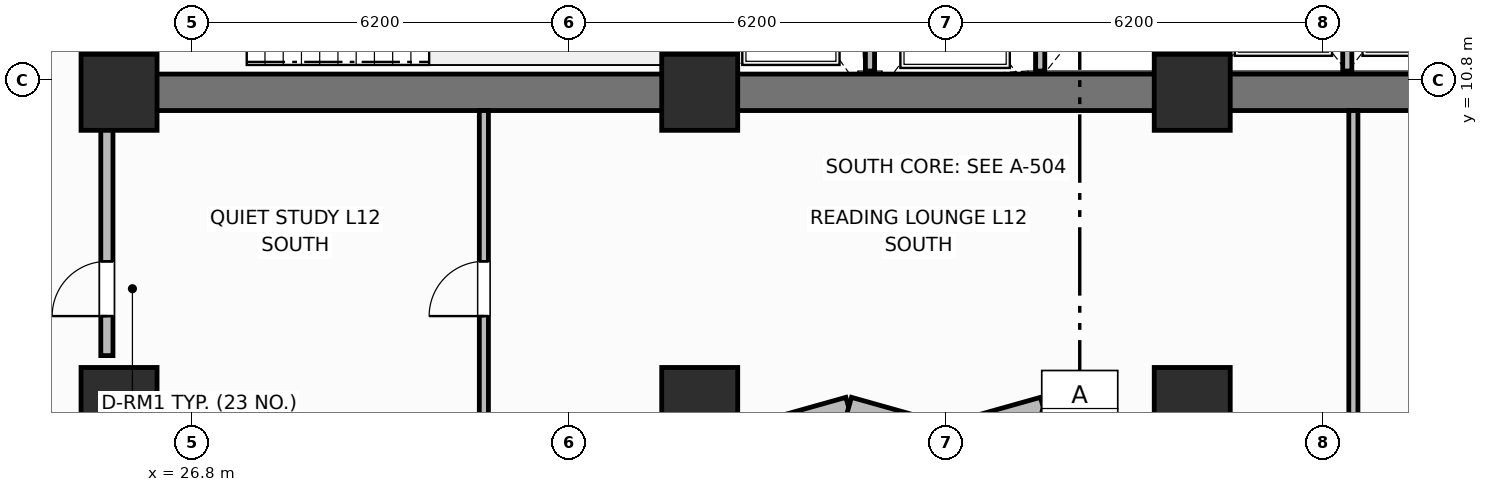
"""IFC4 building model, lengths in metres.
Left out: names, types, materials, properties, quantities, classifications, styles, units other than length and angle.
Written with IfcOpenShell. Run it as: python <this file> out.ifc"""

import sys

from ifc_helpers import new_model, si_unit, direction, frame, frame_2d, origin, origin_2d, place, context, subcontext, project, spatial, rectangle, extrude, element, fill, save


model = new_model("IFC4")
c1 = context("Model", 3, precision=1e-05, world=origin(), true_north=direction((0.0, 1.0)))
c2 = subcontext(c1, "Body", "Model", "MODEL_VIEW")
j1 = project(units=[si_unit("LENGTHUNIT", "METRE"), si_unit("PLANEANGLEUNIT", "RADIAN")], contexts=[c1])
p1 = place(None, origin())
s1 = spatial("IfcSite", under=j1, at=p1, CompositionType="ELEMENT")
p2 = place(p1, origin())
s2 = spatial("IfcBuilding", under=s1, at=p2, CompositionType="ELEMENT")
p3 = place(p2, frame((0.0, 0.0, 51.0)))
s3 = spatial("IfcBuildingStorey", under=s2, at=p3, CompositionType="ELEMENT", Elevation=51.0)
p4 = place(p3, frame((52.8, 10.6, 0.0), z_axis=(0.0, 0.0, 1.0), x_axis=(-1.0, 0.0, 0.0)))
e1 = element("IfcWall", 1, at=p4, inside=s3, PredefinedType="SHEAR", context=c2, shape_type="SweptSolid", body=[
    extrude(rectangle(XDim=27.2, YDim=0.6, at=frame_2d((13.6, 0.0))), origin(), (0.0, 0.0, 1.0), 3.7),
])
p5 = place(p3, frame((25.6, 10.9, 0.0), z_axis=(0.0, 0.0, 1.0), x_axis=(0.0, 1.0, 0.0)))
e2 = element("IfcWall", 2, at=p5, inside=s3, PredefinedType="SHEAR", context=c2, shape_type="SweptSolid", body=[
    extrude(rectangle(XDim=5.6, YDim=0.6, at=frame_2d((2.8, 0.0))), origin(), (0.0, 0.0, 1.0), 3.7),
])
for number, where, z_axis, x_axis in (
    (3, (35.15, 10.9, 0.0), (0.0, 0.0, 1.0), (0.0, 1.0, 0.0)),
    (4, (43.25, 10.9, 0.0), (0.0, 0.0, 1.0), (0.0, 1.0, 0.0)),
):
    element("IfcWall", number, at=place(p3, frame(where, z_axis=z_axis, x_axis=x_axis)), inside=s3, PredefinedType="SHEAR", context=c2, shape_type="SweptSolid", body=[
        extrude(rectangle(XDim=5.6, YDim=0.4, at=frame_2d((2.8, 0.0))), origin(), (0.0, 0.0, 1.0), 3.7),
    ])
for number, where, z_axis, x_axis in (
    (5, (25.6, 10.6, 0.0), (0.0, 0.0, 1.0), (1.0, 0.0, 0.0)),
    (6, (35.15, 10.6, 0.0), (0.0, 0.0, 1.0), (1.0, 0.0, 0.0)),
    (7, (43.25, 10.6, 0.0), (0.0, 0.0, 1.0), (1.0, 0.0, 0.0)),
    (8, (25.6, 5.45, 0.0), (0.0, 0.0, 1.0), (1.0, 0.0, 0.0)),
    (9, (35.15, 5.45, 0.0), (0.0, 0.0, 1.0), (1.0, 0.0, 0.0)),
    (10, (43.25, 5.45, 0.0), (0.0, 0.0, 1.0), (1.0, 0.0, 0.0)),
):
    element("IfcColumn", number, at=place(p3, frame(where, z_axis=z_axis, x_axis=x_axis)), inside=s3, PredefinedType="COLUMN", context=c2, shape_type="SweptSolid", body=[
        extrude(rectangle(XDim=1.25, YDim=1.25, at=origin_2d()), origin(), (0.0, 0.0, 1.0), 3.7),
    ])
p6 = place(p3, frame((36.0, 4.97, 0.0), z_axis=(0.0, 0.0, 1.0), x_axis=(0.962662902433, 0.270703040766, 0.0)))
e11 = element("IfcWall", 11, at=p6, inside=s3, PredefinedType="SOLIDWALL", context=c2, shape_type="SweptSolid", body=[
    extrude(rectangle(XDim=1.662, YDim=0.34, at=frame_2d((0.831, 0.0))), origin(), (0.0, 0.0, 1.0), 2.7),
])
p7 = place(p3, frame((37.6, 5.42, 0.0), z_axis=(0.0, 0.0, 1.0), x_axis=(0.962652136636, -0.270741322725, 0.0)))
e12 = element("IfcWall", 12, at=p7, inside=s3, PredefinedType="SOLIDWALL", context=c2, shape_type="SweptSolid", body=[
    extrude(rectangle(XDim=1.662, YDim=0.34, at=frame_2d((0.831, 0.0))), origin(), (0.0, 0.0, 1.0), 2.7),
])
p8 = place(p3, frame((39.2, 4.97, 0.0), z_axis=(0.0, 0.0, 1.0), x_axis=(0.962662902433, 0.270703040766, 0.0)))
e13 = element("IfcWall", 13, at=p8, inside=s3, PredefinedType="SOLIDWALL", context=c2, shape_type="SweptSolid", body=[
    extrude(rectangle(XDim=1.662, YDim=0.34, at=frame_2d((0.831, 0.0))), origin(), (0.0, 0.0, 1.0), 2.7),
])
p9 = place(p3, frame((40.8, 5.42, 0.0), z_axis=(0.0, 0.0, 1.0), x_axis=(0.962652136636, -0.270741322725, 0.0)))
e14 = element("IfcWall", 14, at=p9, inside=s3, PredefinedType="SOLIDWALL", context=c2, shape_type="SweptSolid", body=[
    extrude(rectangle(XDim=1.662, YDim=0.34, at=frame_2d((0.831, 0.0))), origin(), (0.0, 0.0, 1.0), 2.7),
])
for number, where, z_axis, x_axis in (
    (15, (37.95, 10.95, 0.0), (0.0, 0.0, 1.0), (0.0, 1.0, 0.0)),
    (16, (40.75, 10.95, 0.0), (0.0, 0.0, 1.0), (0.0, 1.0, 0.0)),
):
    element("IfcWall", number, at=place(p3, frame(where, z_axis=z_axis, x_axis=x_axis)), inside=s3, PredefinedType="PARTITIONING", context=c2, shape_type="SweptSolid", body=[
        extrude(rectangle(XDim=2.75, YDim=0.15, at=frame_2d((1.375, 0.0))), origin(), (0.0, 0.0, 1.0), 2.53),
    ])
p10 = place(p3, frame((45.8, 10.95, 0.0), z_axis=(0.0, 0.0, 1.0), x_axis=(0.0, 1.0, 0.0)))
e17 = element("IfcWall", 17, at=p10, inside=s3, PredefinedType="PARTITIONING", context=c2, shape_type="SweptSolid", body=[
    extrude(rectangle(XDim=2.7, YDim=0.15, at=frame_2d((1.35, 0.0))), origin(), (0.0, 0.0, 1.0), 2.53),
])
p11 = place(p3, frame((31.6, 4.97, 0.0), z_axis=(0.0, 0.0, 1.0), x_axis=(0.0, 1.0, 0.0)))
e18 = element("IfcWall", 18, at=p11, inside=s3, PredefinedType="PARTITIONING", context=c2, shape_type="SweptSolid", body=[
    extrude(rectangle(XDim=5.33, YDim=0.15, at=frame_2d((2.665, 0.0))), origin(), (0.0, 0.0, 1.0), 2.53),
])
p12 = place(p11, frame((1.95, 0.0, 0.0)))
e19 = element("IfcOpeningElement", 19, at=p12, cuts=e18, PredefinedType="OPENING", context=c2, shape_type="SweptSolid", body=[
    extrude(rectangle(XDim=0.9, YDim=2.1, at=frame_2d((0.45, 1.05))), frame((0.0, 0.085, 0.0), z_axis=(0.0, -1.0, 0.0), x_axis=(1.0, 0.0, 0.0)), (0.0, 0.0, 1.0), 0.17),
])
p13 = place(p3, frame((45.9, 4.97, 0.0), z_axis=(0.0, 0.0, 1.0), x_axis=(0.0, 1.0, 0.0)))
e20 = element("IfcWall", 20, at=p13, inside=s3, PredefinedType="PARTITIONING", context=c2, shape_type="SweptSolid", body=[
    extrude(rectangle(XDim=5.33, YDim=0.15, at=frame_2d((2.665, 0.0))), origin(), (0.0, 0.0, 1.0), 2.53),
])
p14 = place(p3, frame((25.4, 6.27, 0.0), z_axis=(0.0, 0.0, 1.0), x_axis=(0.0, 1.0, 0.0)))
e21 = element("IfcWall", 21, at=p14, inside=s3, PredefinedType="PARTITIONING", context=c2, shape_type="SweptSolid", body=[
    extrude(rectangle(XDim=4.03, YDim=0.2, at=frame_2d((2.015, 0.0))), origin(), (0.0, 0.0, 1.0), 2.53),
])
p15 = place(p14, frame((0.65, 0.0, 0.0)))
e22 = element("IfcOpeningElement", 22, at=p15, cuts=e21, PredefinedType="OPENING", context=c2, shape_type="SweptSolid", body=[
    extrude(rectangle(XDim=0.9, YDim=2.1, at=frame_2d((0.45, 1.05))), frame((0.0, 0.11, 0.0), z_axis=(0.0, -1.0, 0.0), x_axis=(1.0, 0.0, 0.0)), (0.0, 0.0, 1.0), 0.22),
])
p16 = place(p12, origin())
e23 = element("IfcDoor", 23, at=p16, inside=s3, OperationType="SINGLE_SWING_LEFT", PredefinedType="DOOR", context=c2, shape_type="SweptSolid", body=[
    extrude(rectangle(XDim=0.9, YDim=2.1, at=frame_2d((0.45, 1.05))), frame((0.0, 0.025, 0.0), z_axis=(0.0, -1.0, 0.0), x_axis=(1.0, 0.0, 0.0)), (0.0, 0.0, 1.0), 0.05),
])
fill(e19, e23)
p17 = place(p15, origin())
e24 = element("IfcDoor", 24, at=p17, inside=s3, OperationType="SINGLE_SWING_LEFT", PredefinedType="DOOR", context=c2, shape_type="SweptSolid", body=[
    extrude(rectangle(XDim=0.9, YDim=2.1, at=frame_2d((0.45, 1.05))), frame((0.0, 0.025, 0.0), z_axis=(0.0, -1.0, 0.0), x_axis=(1.0, 0.0, 0.0)), (0.0, 0.0, 1.0), 0.05),
])
fill(e22, e24)
save(model, sys.argv[1])
